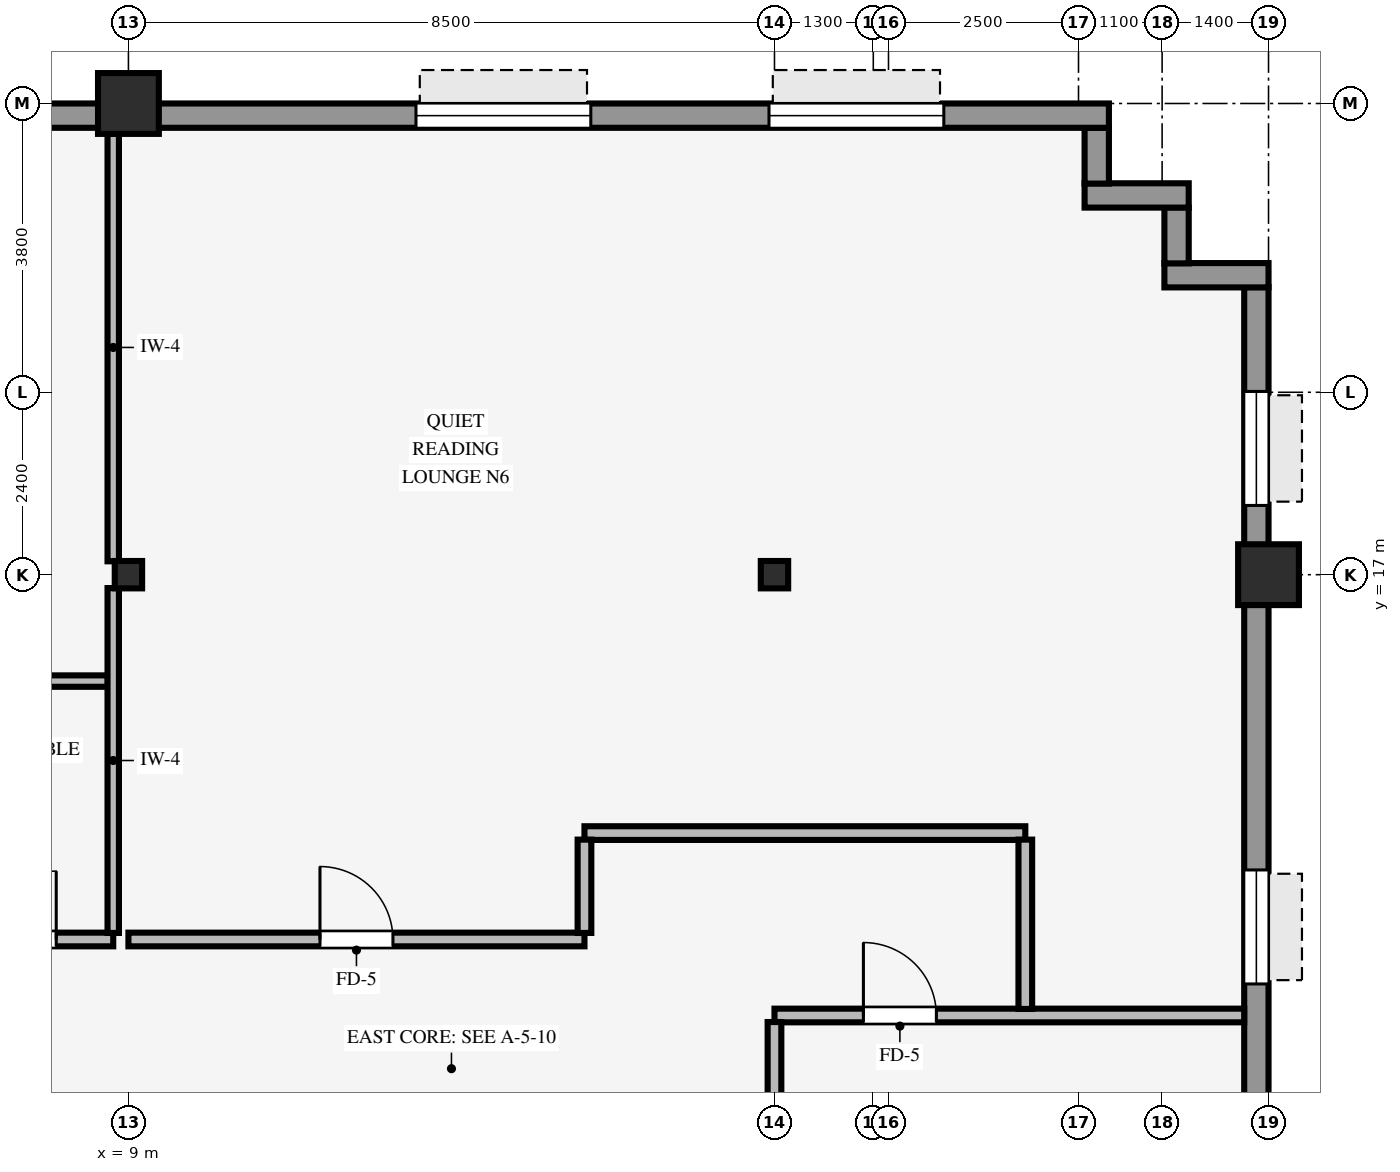
"""IFC4 building model, lengths in metres.
Left out: names, types, materials, properties, quantities, classifications, styles, units other than length and angle.
Written with IfcOpenShell. Run it as: python <this file> out.ifc"""

import sys

from ifc_helpers import new_model, si_unit, direction, frame, frame_2d, origin, origin_2d, place, context, subcontext, project, spatial, rectangle, hollow_rectangle, i_section, extrude, source, transform, mapped, element, fill, save


model = new_model("IFC4")
c1 = context("Model", 3, precision=1e-05, world=origin(), true_north=direction((0.0, 1.0)))
c2 = subcontext(c1, "Body", "Model", "MODEL_VIEW")
j1 = project(units=[si_unit("LENGTHUNIT", "METRE"), si_unit("PLANEANGLEUNIT", "RADIAN")], contexts=[c1])
p1 = place(None, origin())
s1 = spatial("IfcSite", under=j1, at=p1, CompositionType="ELEMENT")
p2 = place(p1, origin())
s2 = spatial("IfcBuilding", under=s1, at=p2, CompositionType="ELEMENT")
p3 = place(p2, frame((0.0, 0.0, 86.0)))
s3 = spatial("IfcBuildingStorey", under=s2, at=p3, CompositionType="ELEMENT", Elevation=86.0)
p4 = place(p3, frame((24.0, 17.0, -0.4), z_axis=(0.0, 0.0, 1.0), x_axis=(1.0, 0.0, 0.0)))
e1 = element("IfcColumn", 1, at=p4, inside=s3, PredefinedType="COLUMN", context=c2, shape_type="SweptSolid", body=[
    extrude(hollow_rectangle(XDim=0.8, YDim=0.8, WallThickness=0.055, InnerFilletRadius=0.055, OuterFilletRadius=0.11, at=origin_2d()), origin(), (0.0, 0.0, 1.0), 3.77),
])
p5 = place(p3, frame((9.0, 23.2, 0.0), z_axis=(0.0, 0.0, 1.0), x_axis=(1.0, 0.0, 0.0)))
e2 = element("IfcColumn", 2, at=p5, inside=s3, PredefinedType="COLUMN", context=c2, shape_type="SweptSolid", body=[
    extrude(hollow_rectangle(XDim=0.8, YDim=0.8, WallThickness=0.055, InnerFilletRadius=0.055, OuterFilletRadius=0.11, at=origin_2d()), origin(), (0.0, 0.0, 1.0), 3.37),
])
for number, where, z_axis, x_axis in (
    (3, (9.0, 17.0, 0.0), (0.0, 0.0, 1.0), (1.0, 0.0, 0.0)),
    (4, (17.5, 17.0, 0.0), (0.0, 0.0, 1.0), (1.0, 0.0, 0.0)),
):
    element("IfcColumn", number, at=place(p3, frame(where, z_axis=z_axis, x_axis=x_axis)), inside=s3, PredefinedType="COLUMN", context=c2, shape_type="SweptSolid", body=[
        extrude(i_section(OverallWidth=0.36, OverallDepth=0.36, WebThickness=0.021, FlangeThickness=0.021, FilletRadius=0.018, at=origin_2d()), origin(), (0.0, 0.0, 1.0), 3.37),
    ])
p6 = place(p3, frame((23.84, -20.784, 0.0), z_axis=(0.0, 0.0, 1.0), x_axis=(0.0, 1.0, 0.0)))
e5 = element("IfcWall", 5, at=p6, inside=s3, PredefinedType="STANDARD", context=c2, shape_type="SweptSolid", body=[
    extrude(rectangle(XDim=41.568, YDim=0.32, at=frame_2d((20.784, 0.0))), origin(), (0.0, 0.0, 1.0), 2.705),
])
p7 = place(p6, frame((26.034, 0.0, 0.0), z_axis=(0.0, 0.0, 1.0), x_axis=(-1.0, 0.0, 0.0)))
e6 = element("IfcOpeningElement", 6, at=p7, cuts=e5, PredefinedType="OPENING", context=c2, shape_type="SweptSolid", body=[
    extrude(rectangle(XDim=1.05, YDim=2.1, at=frame_2d((0.525, 1.05))), frame((0.0, 0.17, 0.0), z_axis=(0.0, -1.0, 0.0), x_axis=(1.0, 0.0, 0.0)), (0.0, 0.0, 1.0), 0.34),
])
p8 = place(p6, frame((1.373, 0.0, 0.8)))
e7 = element("IfcOpeningElement", 7, at=p8, cuts=e5, PredefinedType="OPENING", context=c2, shape_type="SweptSolid", body=[
    extrude(rectangle(XDim=1.5, YDim=1.6, at=frame_2d((0.75, 0.8))), frame((0.0, 0.17, 0.0), z_axis=(0.0, -1.0, 0.0), x_axis=(1.0, 0.0, 0.0)), (0.0, 0.0, 1.0), 0.34),
])
p9 = place(p6, frame((7.669, 0.0, 0.8)))
e8 = element("IfcOpeningElement", 8, at=p9, cuts=e5, PredefinedType="OPENING", context=c2, shape_type="SweptSolid", body=[
    extrude(rectangle(XDim=1.5, YDim=1.6, at=frame_2d((0.75, 0.8))), frame((0.0, 0.17, 0.0), z_axis=(0.0, -1.0, 0.0), x_axis=(1.0, 0.0, 0.0)), (0.0, 0.0, 1.0), 0.34),
])
p10 = place(p6, frame((12.615, 0.0, 0.8)))
e9 = element("IfcOpeningElement", 9, at=p10, cuts=e5, PredefinedType="OPENING", context=c2, shape_type="SweptSolid", body=[
    extrude(rectangle(XDim=1.5, YDim=1.6, at=frame_2d((0.75, 0.8))), frame((0.0, 0.17, 0.0), z_axis=(0.0, -1.0, 0.0), x_axis=(1.0, 0.0, 0.0)), (0.0, 0.0, 1.0), 0.34),
])
p11 = place(p6, frame((17.561, 0.0, 0.8)))
e10 = element("IfcOpeningElement", 10, at=p11, cuts=e5, PredefinedType="OPENING", context=c2, shape_type="SweptSolid", body=[
    extrude(rectangle(XDim=1.5, YDim=1.6, at=frame_2d((0.75, 0.8))), frame((0.0, 0.17, 0.0), z_axis=(0.0, -1.0, 0.0), x_axis=(1.0, 0.0, 0.0)), (0.0, 0.0, 1.0), 0.34),
])
p12 = place(p6, frame((22.507, 0.0, 0.8)))
e11 = element("IfcOpeningElement", 11, at=p12, cuts=e5, PredefinedType="OPENING", context=c2, shape_type="SweptSolid", body=[
    extrude(rectangle(XDim=1.5, YDim=1.6, at=frame_2d((0.75, 0.8))), frame((0.0, 0.17, 0.0), z_axis=(0.0, -1.0, 0.0), x_axis=(1.0, 0.0, 0.0)), (0.0, 0.0, 1.0), 0.34),
])
p13 = place(p6, frame((27.453, 0.0, 0.8)))
e12 = element("IfcOpeningElement", 12, at=p13, cuts=e5, PredefinedType="OPENING", context=c2, shape_type="SweptSolid", body=[
    extrude(rectangle(XDim=1.5, YDim=1.6, at=frame_2d((0.75, 0.8))), frame((0.0, 0.17, 0.0), z_axis=(0.0, -1.0, 0.0), x_axis=(1.0, 0.0, 0.0)), (0.0, 0.0, 1.0), 0.34),
])
p14 = place(p6, frame((32.399, 0.0, 0.8)))
e13 = element("IfcOpeningElement", 13, at=p14, cuts=e5, PredefinedType="OPENING", context=c2, shape_type="SweptSolid", body=[
    extrude(rectangle(XDim=1.5, YDim=1.6, at=frame_2d((0.75, 0.8))), frame((0.0, 0.17, 0.0), z_axis=(0.0, -1.0, 0.0), x_axis=(1.0, 0.0, 0.0)), (0.0, 0.0, 1.0), 0.34),
])
p15 = place(p6, frame((38.695, 0.0, 0.8)))
e14 = element("IfcOpeningElement", 14, at=p15, cuts=e5, PredefinedType="OPENING", context=c2, shape_type="SweptSolid", body=[
    extrude(rectangle(XDim=1.5, YDim=1.6, at=frame_2d((0.75, 0.8))), frame((0.0, 0.17, 0.0), z_axis=(0.0, -1.0, 0.0), x_axis=(1.0, 0.0, 0.0)), (0.0, 0.0, 1.0), 0.34),
])
p16 = place(p3, frame((22.63, 20.94, 0.0), z_axis=(0.0, 0.0, 1.0), x_axis=(1.0, 0.0, 0.0)))
e15 = element("IfcWall", 15, at=p16, inside=s3, PredefinedType="STANDARD", context=c2, shape_type="SweptSolid", body=[
    extrude(rectangle(XDim=1.37, YDim=0.32, at=frame_2d((0.685, 0.0))), origin(), (0.0, 0.0, 1.0), 3.36),
])
p17 = place(p3, frame((22.79, 21.096, 0.0), z_axis=(0.0, 0.0, 1.0), x_axis=(0.0, 1.0, 0.0)))
e16 = element("IfcWall", 16, at=p17, inside=s3, PredefinedType="STANDARD", context=c2, shape_type="SweptSolid", body=[
    extrude(rectangle(XDim=0.738, YDim=0.32, at=frame_2d((0.369, 0.0))), origin(), (0.0, 0.0, 1.0), 3.36),
])
p18 = place(p3, frame((21.58, 21.99, 0.0), z_axis=(0.0, 0.0, 1.0), x_axis=(1.0, 0.0, 0.0)))
e17 = element("IfcWall", 17, at=p18, inside=s3, PredefinedType="STANDARD", context=c2, shape_type="SweptSolid", body=[
    extrude(rectangle(XDim=1.37, YDim=0.32, at=frame_2d((0.685, 0.0))), origin(), (0.0, 0.0, 1.0), 3.36),
])
p19 = place(p3, frame((21.74, 22.146, 0.0), z_axis=(0.0, 0.0, 1.0), x_axis=(0.0, 1.0, 0.0)))
e18 = element("IfcWall", 18, at=p19, inside=s3, PredefinedType="STANDARD", context=c2, shape_type="SweptSolid", body=[
    extrude(rectangle(XDim=0.738, YDim=0.32, at=frame_2d((0.369, 0.0))), origin(), (0.0, 0.0, 1.0), 3.36),
])
p20 = place(p3, frame((-21.9, 23.04, 0.0), z_axis=(0.0, 0.0, 1.0), x_axis=(1.0, 0.0, 0.0)))
e19 = element("IfcWall", 19, at=p20, inside=s3, PredefinedType="STANDARD", context=c2, shape_type="SweptSolid", body=[
    extrude(rectangle(XDim=43.8, YDim=0.32, at=frame_2d((21.9, 0.0))), origin(), (0.0, 0.0, 1.0), 2.705),
])
p21 = place(p20, frame((2.622, 0.0, 0.8)))
e20 = element("IfcOpeningElement", 20, at=p21, cuts=e19, PredefinedType="OPENING", context=c2, shape_type="SweptSolid", body=[
    extrude(rectangle(XDim=2.3, YDim=1.62, at=frame_2d((1.15, 0.81))), frame((0.0, 0.17, 0.0), z_axis=(0.0, -1.0, 0.0), x_axis=(1.0, 0.0, 0.0)), (0.0, 0.0, 1.0), 0.34),
])
p22 = place(p20, frame((8.167, 0.0, 0.8)))
e21 = element("IfcOpeningElement", 21, at=p22, cuts=e19, PredefinedType="OPENING", context=c2, shape_type="SweptSolid", body=[
    extrude(rectangle(XDim=2.3, YDim=1.62, at=frame_2d((1.15, 0.81))), frame((0.0, 0.17, 0.0), z_axis=(0.0, -1.0, 0.0), x_axis=(1.0, 0.0, 0.0)), (0.0, 0.0, 1.0), 0.34),
])
p23 = place(p20, frame((16.106, 0.0, 0.8)))
e22 = element("IfcOpeningElement", 22, at=p23, cuts=e19, PredefinedType="OPENING", context=c2, shape_type="SweptSolid", body=[
    extrude(rectangle(XDim=2.3, YDim=1.62, at=frame_2d((1.15, 0.81))), frame((0.0, 0.17, 0.0), z_axis=(0.0, -1.0, 0.0), x_axis=(1.0, 0.0, 0.0)), (0.0, 0.0, 1.0), 0.34),
])
p24 = place(p20, frame((25.394, 0.0, 0.8)))
e23 = element("IfcOpeningElement", 23, at=p24, cuts=e19, PredefinedType="OPENING", context=c2, shape_type="SweptSolid", body=[
    extrude(rectangle(XDim=2.3, YDim=1.62, at=frame_2d((1.15, 0.81))), frame((0.0, 0.17, 0.0), z_axis=(0.0, -1.0, 0.0), x_axis=(1.0, 0.0, 0.0)), (0.0, 0.0, 1.0), 0.34),
])
p25 = place(p20, frame((34.683, 0.0, 0.8)))
e24 = element("IfcOpeningElement", 24, at=p25, cuts=e19, PredefinedType="OPENING", context=c2, shape_type="SweptSolid", body=[
    extrude(rectangle(XDim=2.3, YDim=1.62, at=frame_2d((1.15, 0.81))), frame((0.0, 0.17, 0.0), z_axis=(0.0, -1.0, 0.0), x_axis=(1.0, 0.0, 0.0)), (0.0, 0.0, 1.0), 0.34),
])
p26 = place(p20, frame((39.328, 0.0, 0.8)))
e25 = element("IfcOpeningElement", 25, at=p26, cuts=e19, PredefinedType="OPENING", context=c2, shape_type="SweptSolid", body=[
    extrude(rectangle(XDim=2.3, YDim=1.62, at=frame_2d((1.15, 0.81))), frame((0.0, 0.17, 0.0), z_axis=(0.0, -1.0, 0.0), x_axis=(1.0, 0.0, 0.0)), (0.0, 0.0, 1.0), 0.34),
])
p27 = place(p3, frame((17.5, 11.2, 0.0), z_axis=(0.0, 0.0, 1.0), x_axis=(1.0, 0.0, 0.0)))
e26 = element("IfcWall", 26, at=p27, inside=s3, PredefinedType="PARTITIONING", context=c2, shape_type="SweptSolid", body=[
    extrude(rectangle(XDim=6.18, YDim=0.18, at=frame_2d((3.09, 0.0))), origin(), (0.0, 0.0, 1.0), 3.36),
])
p28 = place(p27, frame((1.17, 0.0, 0.0)))
e27 = element("IfcOpeningElement", 27, at=p28, cuts=e26, PredefinedType="OPENING", context=c2, shape_type="SweptSolid", body=[
    extrude(rectangle(XDim=0.96, YDim=2.1, at=frame_2d((0.48, 1.05))), frame((0.0, 0.1, 0.0), z_axis=(0.0, -1.0, 0.0), x_axis=(1.0, 0.0, 0.0)), (0.0, 0.0, 1.0), 0.2),
])
p29 = place(p3, frame((-15.0, 12.2, 0.0), z_axis=(0.0, 0.0, 1.0), x_axis=(1.0, 0.0, 0.0)))
e28 = element("IfcWall", 28, at=p29, inside=s3, PredefinedType="PARTITIONING", context=c2, shape_type="SweptSolid", body=[
    extrude(rectangle(XDim=23.8, YDim=0.18, at=frame_2d((11.9, 0.0))), origin(), (0.0, 0.0, 1.0), 3.36),
])
p30 = place(p29, frame((3.98, 0.0, 0.0)))
e29 = element("IfcOpeningElement", 29, at=p30, cuts=e28, PredefinedType="OPENING", context=c2, shape_type="SweptSolid", body=[
    extrude(rectangle(XDim=0.96, YDim=2.1, at=frame_2d((0.48, 1.05))), frame((0.0, 0.1, 0.0), z_axis=(0.0, -1.0, 0.0), x_axis=(1.0, 0.0, 0.0)), (0.0, 0.0, 1.0), 0.2),
])
p31 = place(p29, frame((9.39, 0.0, 0.0)))
e30 = element("IfcOpeningElement", 30, at=p31, cuts=e28, PredefinedType="OPENING", context=c2, shape_type="SweptSolid", body=[
    extrude(rectangle(XDim=0.96, YDim=2.1, at=frame_2d((0.48, 1.05))), frame((0.0, 0.1, 0.0), z_axis=(0.0, -1.0, 0.0), x_axis=(1.0, 0.0, 0.0)), (0.0, 0.0, 1.0), 0.2),
])
p32 = place(p29, frame((19.65, 0.0, 0.0)))
e31 = element("IfcOpeningElement", 31, at=p32, cuts=e28, PredefinedType="OPENING", context=c2, shape_type="SweptSolid", body=[
    extrude(rectangle(XDim=0.9, YDim=2.1, at=frame_2d((0.45, 1.05))), frame((0.0, 0.1, 0.0), z_axis=(0.0, -1.0, 0.0), x_axis=(1.0, 0.0, 0.0)), (0.0, 0.0, 1.0), 0.2),
])
p33 = place(p29, frame((17.05, 0.0, 0.0)))
e32 = element("IfcOpeningElement", 32, at=p33, cuts=e28, PredefinedType="OPENING", context=c2, shape_type="SweptSolid", body=[
    extrude(rectangle(XDim=0.9, YDim=2.1, at=frame_2d((0.45, 1.05))), frame((0.0, 0.1, 0.0), z_axis=(0.0, -1.0, 0.0), x_axis=(1.0, 0.0, 0.0)), (0.0, 0.0, 1.0), 0.2),
])
p34 = place(p29, frame((22.15, 0.0, 0.0)))
e33 = element("IfcOpeningElement", 33, at=p34, cuts=e28, PredefinedType="OPENING", context=c2, shape_type="SweptSolid", body=[
    extrude(rectangle(XDim=0.9, YDim=2.1, at=frame_2d((0.45, 1.05))), frame((0.0, 0.1, 0.0), z_axis=(0.0, -1.0, 0.0), x_axis=(1.0, 0.0, 0.0)), (0.0, 0.0, 1.0), 0.2),
])
p35 = place(p29, frame((14.72, 0.0, 0.0)))
e34 = element("IfcOpeningElement", 34, at=p35, cuts=e28, PredefinedType="OPENING", context=c2, shape_type="SweptSolid", body=[
    extrude(rectangle(XDim=0.96, YDim=2.1, at=frame_2d((0.48, 1.05))), frame((0.0, 0.1, 0.0), z_axis=(0.0, -1.0, 0.0), x_axis=(1.0, 0.0, 0.0)), (0.0, 0.0, 1.0), 0.2),
])
p36 = place(p3, frame((9.0, 12.2, 0.0), z_axis=(0.0, 0.0, 1.0), x_axis=(1.0, 0.0, 0.0)))
e35 = element("IfcWall", 35, at=p36, inside=s3, PredefinedType="PARTITIONING", context=c2, shape_type="SweptSolid", body=[
    extrude(rectangle(XDim=6.0, YDim=0.18, at=frame_2d((3.0, 0.0))), origin(), (0.0, 0.0, 1.0), 3.36),
])
p37 = place(p36, frame((2.52, 0.0, 0.0)))
e36 = element("IfcOpeningElement", 36, at=p37, cuts=e35, PredefinedType="OPENING", context=c2, shape_type="SweptSolid", body=[
    extrude(rectangle(XDim=0.96, YDim=2.1, at=frame_2d((0.48, 1.05))), frame((0.0, 0.1, 0.0), z_axis=(0.0, -1.0, 0.0), x_axis=(1.0, 0.0, 0.0)), (0.0, 0.0, 1.0), 0.2),
])
p38 = place(p3, frame((15.0, 13.6, 0.0), z_axis=(0.0, 0.0, 1.0), x_axis=(1.0, 0.0, 0.0)))
e37 = element("IfcWall", 37, at=p38, inside=s3, PredefinedType="PARTITIONING", context=c2, shape_type="SweptSolid", body=[
    extrude(rectangle(XDim=5.8, YDim=0.18, at=frame_2d((2.9, 0.0))), origin(), (0.0, 0.0, 1.0), 2.998),
])
p39 = place(p3, frame((1.2, 15.6, 0.0), z_axis=(0.0, 0.0, 1.0), x_axis=(1.0, 0.0, 0.0)))
e38 = element("IfcWall", 38, at=p39, inside=s3, PredefinedType="PARTITIONING", context=c2, shape_type="SweptSolid", body=[
    extrude(rectangle(XDim=7.529, YDim=0.15, at=frame_2d((3.765, 0.0))), origin(), (0.0, 0.0, 1.0), 3.36),
])
p40 = place(p3, frame((8.8, 12.286, 0.0), z_axis=(0.0, 0.0, 1.0), x_axis=(0.0, 1.0, 0.0)))
e39 = element("IfcWall", 39, at=p40, inside=s3, PredefinedType="PARTITIONING", context=c2, shape_type="SweptSolid", body=[
    extrude(rectangle(XDim=4.538, YDim=0.15, at=frame_2d((2.269, 0.0))), origin(), (0.0, 0.0, 1.0), 2.738),
])
p41 = place(p3, frame((8.8, 17.176, 0.0), z_axis=(0.0, 0.0, 1.0), x_axis=(0.0, 1.0, 0.0)))
e40 = element("IfcWall", 40, at=p41, inside=s3, PredefinedType="PARTITIONING", context=c2, shape_type="SweptSolid", body=[
    extrude(rectangle(XDim=5.628, YDim=0.15, at=frame_2d((2.814, 0.0))), origin(), (0.0, 0.0, 1.0), 2.738),
])
p42 = place(p3, frame((15.0, 12.286, 0.0), z_axis=(0.0, 0.0, 1.0), x_axis=(0.0, 1.0, 0.0)))
e41 = element("IfcWall", 41, at=p42, inside=s3, PredefinedType="PARTITIONING", context=c2, shape_type="SweptSolid", body=[
    extrude(rectangle(XDim=1.228, YDim=0.18, at=frame_2d((0.614, 0.0))), origin(), (0.0, 0.0, 1.0), 3.36),
])
p43 = place(p3, frame((17.5, 10.146, 0.0), z_axis=(0.0, 0.0, 1.0), x_axis=(0.0, 1.0, 0.0)))
e42 = element("IfcWall", 42, at=p43, inside=s3, PredefinedType="PARTITIONING", context=c2, shape_type="SweptSolid", body=[
    extrude(rectangle(XDim=0.968, YDim=0.18, at=frame_2d((0.484, 0.0))), origin(), (0.0, 0.0, 1.0), 2.738),
])
p44 = place(p3, frame((20.8, 11.286, 0.0), z_axis=(0.0, 0.0, 1.0), x_axis=(0.0, 1.0, 0.0)))
e43 = element("IfcWall", 43, at=p44, inside=s3, PredefinedType="PARTITIONING", context=c2, shape_type="SweptSolid", body=[
    extrude(rectangle(XDim=2.228, YDim=0.18, at=frame_2d((1.114, 0.0))), origin(), (0.0, 0.0, 1.0), 3.36),
])
m1 = source(origin(), c2, "Body", "SweptSolid", [
    extrude(rectangle(XDim=1.5, YDim=1.6, at=frame_2d((0.75, 0.8))), frame((0.0, 0.03, 0.0), z_axis=(0.0, -1.0, 0.0), x_axis=(1.0, 0.0, 0.0)), (0.0, 0.0, 1.0), 0.06),
])
p45 = place(p14, origin())
e44 = element("IfcWindow", 44, at=p45, inside=s3, PartitioningType="SINGLE_PANEL", PredefinedType="WINDOW", context=c2, shape_type="MappedRepresentation", body=[
    mapped(m1, transform((0.0, 0.0, 0.0), scale=1.0)),
])
fill(e13, e44)
p46 = place(p15, origin())
e45 = element("IfcWindow", 45, at=p46, inside=s3, PartitioningType="SINGLE_PANEL", PredefinedType="WINDOW", context=c2, shape_type="MappedRepresentation", body=[
    mapped(m1, transform((0.0, 0.0, 0.0), scale=1.0)),
])
fill(e14, e45)
m2 = source(origin(), c2, "Body", "SweptSolid", [
    extrude(rectangle(XDim=2.3, YDim=1.62, at=frame_2d((1.15, 0.81))), frame((0.0, 0.03, 0.0), z_axis=(0.0, -1.0, 0.0), x_axis=(1.0, 0.0, 0.0)), (0.0, 0.0, 1.0), 0.06),
])
p47 = place(p25, origin())
e46 = element("IfcWindow", 46, at=p47, inside=s3, PartitioningType="SINGLE_PANEL", PredefinedType="WINDOW", context=c2, shape_type="MappedRepresentation", body=[
    mapped(m2, transform((0.0, 0.0, 0.0), scale=1.0)),
])
fill(e24, e46)
p48 = place(p26, origin())
e47 = element("IfcWindow", 47, at=p48, inside=s3, PartitioningType="SINGLE_PANEL", PredefinedType="WINDOW", context=c2, shape_type="MappedRepresentation", body=[
    mapped(m2, transform((0.0, 0.0, 0.0), scale=1.0)),
])
fill(e25, e47)
m3 = source(origin(), c2, "Body", "SweptSolid", [
    extrude(rectangle(XDim=0.96, YDim=2.1, at=frame_2d((0.48, 1.05))), frame((0.0, 0.025, 0.0), z_axis=(0.0, -1.0, 0.0), x_axis=(1.0, 0.0, 0.0)), (0.0, 0.0, 1.0), 0.05),
])
p49 = place(p37, origin())
e48 = element("IfcDoor", 48, at=p49, inside=s3, OperationType="SINGLE_SWING_LEFT", PredefinedType="DOOR", context=c2, shape_type="MappedRepresentation", body=[
    mapped(m3, transform((0.0, 0.0, 0.0), scale=1.0)),
])
fill(e36, e48)
p50 = place(p28, origin())
e49 = element("IfcDoor", 49, at=p50, inside=s3, OperationType="SINGLE_SWING_LEFT", PredefinedType="DOOR", context=c2, shape_type="MappedRepresentation", body=[
    mapped(m3, transform((0.0, 0.0, 0.0), scale=1.0)),
])
fill(e27, e49)
m4 = source(origin(), c2, "Body", "SweptSolid", [
    extrude(rectangle(XDim=0.9, YDim=2.1, at=frame_2d((0.45, 1.05))), frame((0.0, 0.025, 0.0), z_axis=(0.0, -1.0, 0.0), x_axis=(1.0, 0.0, 0.0)), (0.0, 0.0, 1.0), 0.05),
])
p51 = place(p34, origin())
e50 = element("IfcDoor", 50, at=p51, inside=s3, OperationType="SINGLE_SWING_RIGHT", PredefinedType="DOOR", context=c2, shape_type="MappedRepresentation", body=[
    mapped(m4, transform((0.0, 0.0, 0.0), scale=1.0)),
])
fill(e33, e50)
save(model, sys.argv[1])
